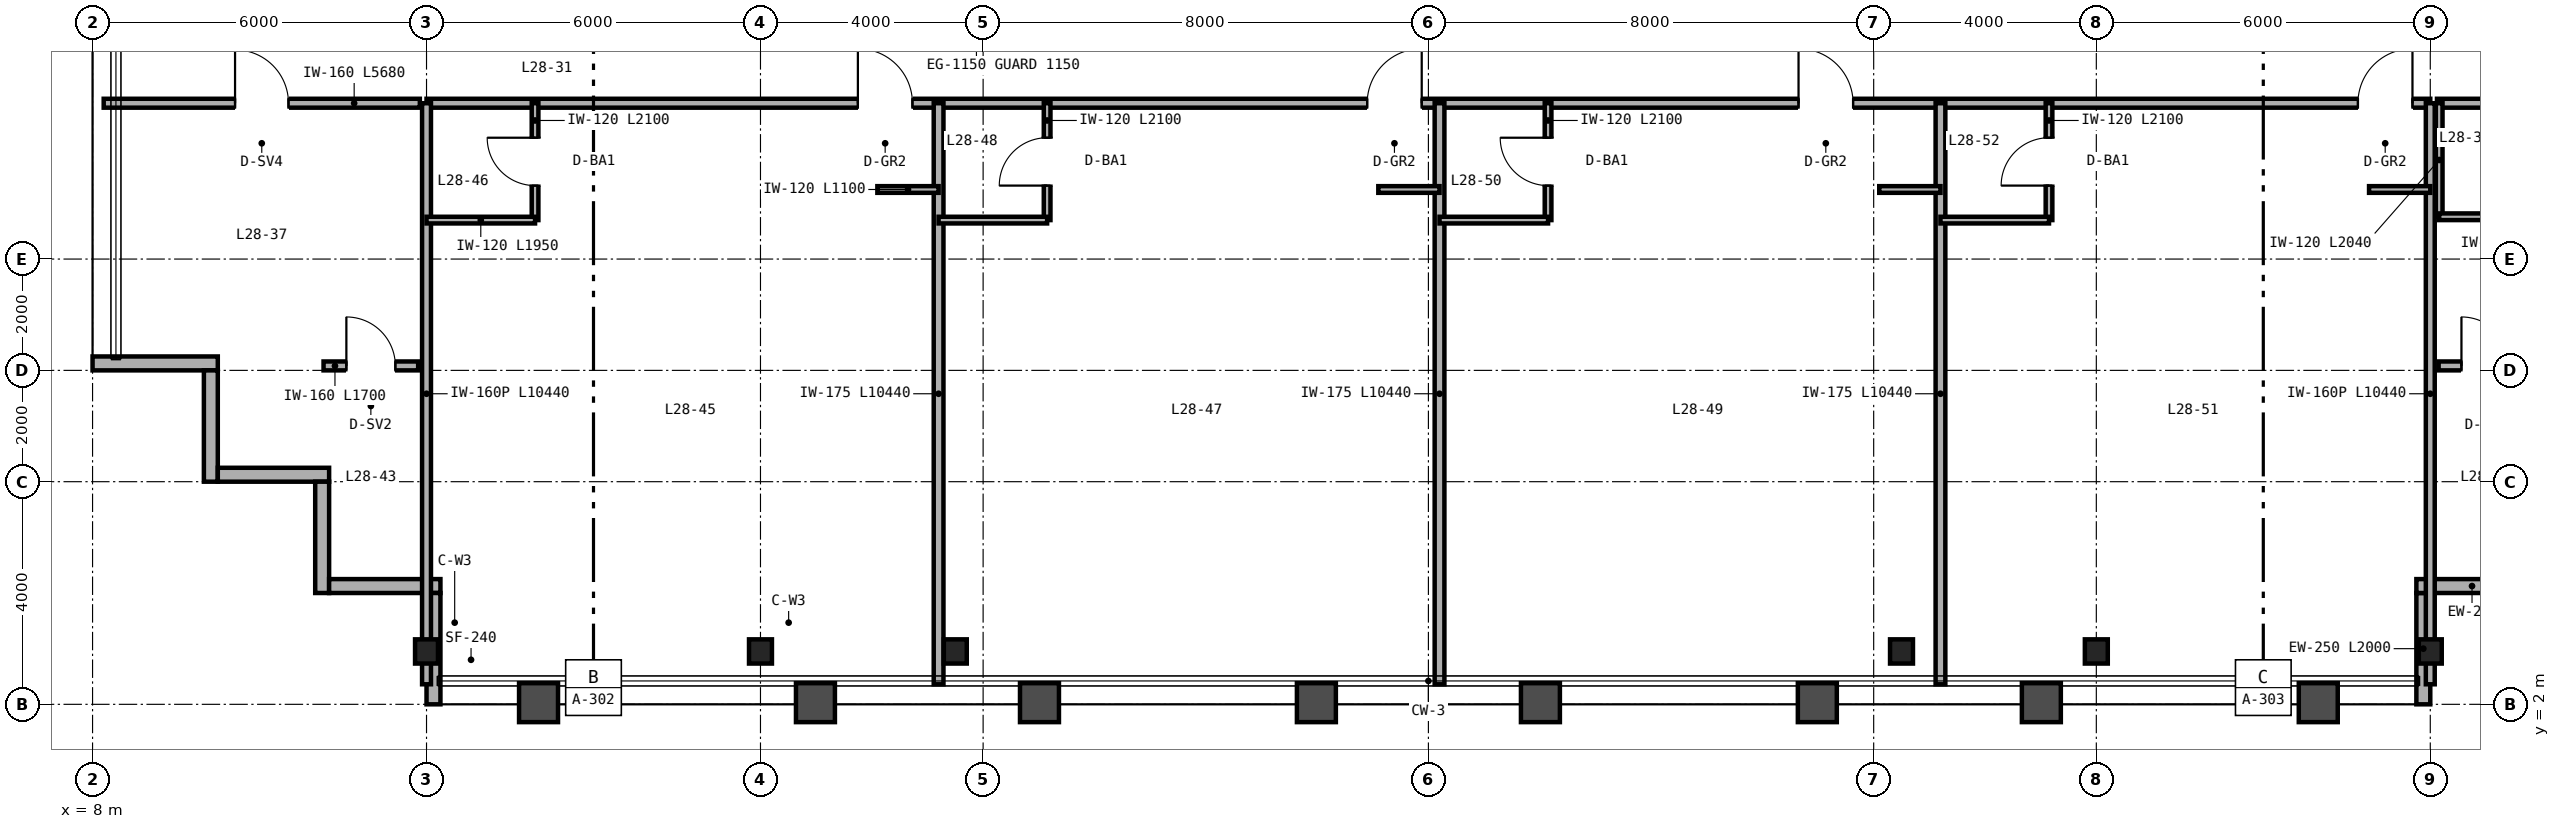
"""IFC4 building model, lengths in metres.
Left out: names, types, materials, properties, quantities, classifications, styles, units other than length and angle.
Written with IfcOpenShell. Run it as: python <this file> out.ifc"""

import sys

from ifc_helpers import new_model, si_unit, direction, frame, frame_2d, origin, origin_2d, place, context, subcontext, project, spatial, rectangle, i_section, extrude, source, transform, mapped, element, fill, save


model = new_model("IFC4")
c1 = context("Model", 3, precision=1e-05, world=origin(), true_north=direction((0.0, 1.0)))
c2 = subcontext(c1, "Body", "Model", "MODEL_VIEW")
j1 = project(units=[si_unit("LENGTHUNIT", "METRE"), si_unit("PLANEANGLEUNIT", "RADIAN")], contexts=[c1])
p1 = place(None, origin())
s1 = spatial("IfcSite", under=j1, at=p1, CompositionType="ELEMENT")
p2 = place(p1, origin())
s2 = spatial("IfcBuilding", under=s1, at=p2, CompositionType="ELEMENT")
p3 = place(p2, frame((0.0, 0.0, 115.2)))
s3 = spatial("IfcBuildingStorey", under=s2, at=p3, CompositionType="ELEMENT", Elevation=115.2)
m1 = source(origin(), c2, "Body", "SweptSolid", [
    extrude(i_section(OverallWidth=0.412, OverallDepth=0.435, WebThickness=0.036, FlangeThickness=0.057, FilletRadius=0.025, at=origin_2d()), origin(), (0.0, 0.0, 1.0), 3.36),
])
for number, where, z_axis, x_axis in (
    (1, (14.0, 2.95, 0.0), (0.0, 0.0, 1.0), (1.0, 0.0, 0.0)),
    (2, (20.0, 2.95, 0.0), (0.0, 0.0, 1.0), (1.0, 0.0, 0.0)),
    (3, (23.5, 2.95, 0.0), (0.0, 0.0, 1.0), (1.0, 0.0, 0.0)),
    (4, (40.5, 2.95, 0.0), (0.0, 0.0, 1.0), (1.0, 0.0, 0.0)),
    (5, (44.0, 2.95, 0.0), (0.0, 0.0, 1.0), (1.0, 0.0, 0.0)),
    (6, (50.0, 2.95, 0.0), (0.0, 0.0, 1.0), (1.0, 0.0, 0.0)),
):
    element("IfcColumn", number, at=place(p3, frame(where, z_axis=z_axis, x_axis=x_axis)), inside=s3, PredefinedType="COLUMN", context=c2, shape_type="MappedRepresentation", body=[
        mapped(m1, transform((0.0, 0.0, 0.0), scale=1.0)),
    ])
p4 = place(p3, frame((49.875, 2.0, 0.0), z_axis=(0.0, 0.0, 1.0), x_axis=(0.0, 1.0, 0.0)))
e7 = element("IfcWall", 7, at=p4, inside=s3, PredefinedType="SOLIDWALL", context=c2, shape_type="SweptSolid", body=[
    extrude(rectangle(XDim=2.0, YDim=0.25, at=frame_2d((1.0, 0.0))), origin(), (0.0, 0.0, 1.0), 2.667),
])
p5 = place(p3, frame((49.75, 4.125, 0.0), z_axis=(0.0, 0.0, 1.0), x_axis=(1.0, 0.0, 0.0)))
e8 = element("IfcWall", 8, at=p5, inside=s3, PredefinedType="SOLIDWALL", context=c2, shape_type="SweptSolid", body=[
    extrude(rectangle(XDim=2.0, YDim=0.25, at=frame_2d((1.0, 0.0))), origin(), (0.0, 0.0, 1.0), 3.36),
])
p6 = place(p3, frame((8.0, 8.125, 0.0), z_axis=(0.0, 0.0, 1.0), x_axis=(1.0, 0.0, 0.0)))
e9 = element("IfcWall", 9, at=p6, inside=s3, PredefinedType="SOLIDWALL", context=c2, shape_type="SweptSolid", body=[
    extrude(rectangle(XDim=2.25, YDim=0.25, at=frame_2d((1.125, 0.0))), origin(), (0.0, 0.0, 1.0), 3.36),
])
for number, where, z_axis, x_axis in (
    (10, (10.125, 8.0, 0.0), (0.0, 0.0, 1.0), (0.0, -1.0, 0.0)),
    (11, (10.25, 6.125, 0.0), (0.0, 0.0, 1.0), (1.0, 0.0, 0.0)),
    (12, (12.125, 6.0, 0.0), (0.0, 0.0, 1.0), (0.0, -1.0, 0.0)),
    (13, (12.25, 4.125, 0.0), (0.0, 0.0, 1.0), (1.0, 0.0, 0.0)),
):
    element("IfcWall", number, at=place(p3, frame(where, z_axis=z_axis, x_axis=x_axis)), inside=s3, PredefinedType="SOLIDWALL", context=c2, shape_type="SweptSolid", body=[
        extrude(rectangle(XDim=2.0, YDim=0.25, at=frame_2d((1.0, 0.0))), origin(), (0.0, 0.0, 1.0), 3.36),
    ])
p7 = place(p3, frame((14.125, 4.0, 0.0), z_axis=(0.0, 0.0, 1.0), x_axis=(0.0, -1.0, 0.0)))
e14 = element("IfcWall", 14, at=p7, inside=s3, PredefinedType="SOLIDWALL", context=c2, shape_type="SweptSolid", body=[
    extrude(rectangle(XDim=2.0, YDim=0.25, at=frame_2d((1.0, 0.0))), origin(), (0.0, 0.0, 1.0), 2.667),
])
p8 = place(p3, frame((8.2, 12.8, 0.0), z_axis=(0.0, 0.0, 1.0), x_axis=(1.0, 0.0, 0.0)))
e15 = element("IfcWall", 15, at=p8, inside=s3, PredefinedType="PARTITIONING", context=c2, shape_type="SweptSolid", body=[
    extrude(rectangle(XDim=5.68, YDim=0.16, at=frame_2d((2.84, 0.0))), origin(), (0.0, 0.0, 1.0), 3.36),
])
p9 = place(p8, frame((2.36, 0.0, 0.0)))
e16 = element("IfcOpeningElement", 16, at=p9, cuts=e15, PredefinedType="OPENING", context=c2, shape_type="SweptSolid", body=[
    extrude(rectangle(XDim=0.96, YDim=2.15, at=frame_2d((0.48, 1.075))), frame((0.0, 0.09, 0.0), z_axis=(0.0, -1.0, 0.0), x_axis=(1.0, 0.0, 0.0)), (0.0, 0.0, 1.0), 0.18),
])
p10 = place(p3, frame((50.12, 12.8, 0.0), z_axis=(0.0, 0.0, 1.0), x_axis=(1.0, 0.0, 0.0)))
e17 = element("IfcWall", 17, at=p10, inside=s3, PredefinedType="PARTITIONING", context=c2, shape_type="SweptSolid", body=[
    extrude(rectangle(XDim=5.68, YDim=0.16, at=frame_2d((2.84, 0.0))), origin(), (0.0, 0.0, 1.0), 3.36),
])
p11 = place(p10, frame((3.15, 0.0, 0.0)))
e18 = element("IfcOpeningElement", 18, at=p11, cuts=e17, PredefinedType="OPENING", context=c2, shape_type="SweptSolid", body=[
    extrude(rectangle(XDim=0.94, YDim=2.15, at=frame_2d((0.47, 1.075))), frame((0.0, 0.09, 0.0), z_axis=(0.0, -1.0, 0.0), x_axis=(1.0, 0.0, 0.0)), (0.0, 0.0, 1.0), 0.18),
])
p12 = place(p3, frame((50.16, 10.76, 0.0), z_axis=(0.0, 0.0, 1.0), x_axis=(0.0, 1.0, 0.0)))
e19 = element("IfcWall", 19, at=p12, inside=s3, PredefinedType="PARTITIONING", context=c2, shape_type="SweptSolid", body=[
    extrude(rectangle(XDim=2.04, YDim=0.12, at=frame_2d((1.02, 0.0))), origin(), (0.0, 0.0, 1.0), 3.36),
])
p13 = place(p3, frame((50.16, 10.76, 0.0), z_axis=(0.0, 0.0, 1.0), x_axis=(1.0, 0.0, 0.0)))
e20 = element("IfcWall", 20, at=p13, inside=s3, PredefinedType="PARTITIONING", context=c2, shape_type="SweptSolid", body=[
    extrude(rectangle(XDim=1.65, YDim=0.12, at=frame_2d((0.825, 0.0))), origin(), (0.0, 0.0, 1.0), 3.36),
])
p14 = place(p3, frame((12.15, 8.08, 0.0), z_axis=(0.0, 0.0, 1.0), x_axis=(1.0, 0.0, 0.0)))
e21 = element("IfcWall", 21, at=p14, inside=s3, PredefinedType="PARTITIONING", context=c2, shape_type="SweptSolid", body=[
    extrude(rectangle(XDim=1.7, YDim=0.16, at=frame_2d((0.85, 0.0))), origin(), (0.0, 0.0, 1.0), 3.36),
])
p15 = place(p14, frame((0.41, 0.0, 0.0)))
e22 = element("IfcOpeningElement", 22, at=p15, cuts=e21, PredefinedType="OPENING", context=c2, shape_type="SweptSolid", body=[
    extrude(rectangle(XDim=0.88, YDim=2.15, at=frame_2d((0.44, 1.075))), frame((0.0, 0.09, 0.0), z_axis=(0.0, -1.0, 0.0), x_axis=(1.0, 0.0, 0.0)), (0.0, 0.0, 1.0), 0.18),
])
p16 = place(p3, frame((50.15, 8.08, 0.0), z_axis=(0.0, 0.0, 1.0), x_axis=(1.0, 0.0, 0.0)))
e23 = element("IfcWall", 23, at=p16, inside=s3, PredefinedType="PARTITIONING", context=c2, shape_type="SweptSolid", body=[
    extrude(rectangle(XDim=1.7, YDim=0.16, at=frame_2d((0.85, 0.0))), origin(), (0.0, 0.0, 1.0), 3.36),
])
p17 = place(p16, frame((0.41, 0.0, 0.0)))
e24 = element("IfcOpeningElement", 24, at=p17, cuts=e23, PredefinedType="OPENING", context=c2, shape_type="SweptSolid", body=[
    extrude(rectangle(XDim=0.88, YDim=2.15, at=frame_2d((0.44, 1.075))), frame((0.0, 0.09, 0.0), z_axis=(0.0, -1.0, 0.0), x_axis=(1.0, 0.0, 0.0)), (0.0, 0.0, 1.0), 0.18),
])
p18 = place(p3, frame((14.0, 12.8, 0.0), z_axis=(0.0, 0.0, 1.0), x_axis=(1.0, 0.0, 0.0)))
e25 = element("IfcWall", 25, at=p18, inside=s3, PredefinedType="PARTITIONING", context=c2, shape_type="SweptSolid", body=[
    extrude(rectangle(XDim=36.0, YDim=0.16, at=frame_2d((18.0, 0.0))), origin(), (0.0, 0.0, 1.0), 2.581),
])
p19 = place(p18, frame((7.75, 0.0, 0.0)))
e26 = element("IfcOpeningElement", 26, at=p19, cuts=e25, PredefinedType="OPENING", context=c2, shape_type="SweptSolid", body=[
    extrude(rectangle(XDim=0.98, YDim=2.2, at=frame_2d((0.49, 1.1))), frame((0.0, 0.09, 0.0), z_axis=(0.0, -1.0, 0.0), x_axis=(1.0, 0.0, 0.0)), (0.0, 0.0, 1.0), 0.18),
])
p20 = place(p18, frame((16.9, 0.0, 0.0)))
e27 = element("IfcOpeningElement", 27, at=p20, cuts=e25, PredefinedType="OPENING", context=c2, shape_type="SweptSolid", body=[
    extrude(rectangle(XDim=0.98, YDim=2.2, at=frame_2d((0.49, 1.1))), frame((0.0, 0.09, 0.0), z_axis=(0.0, -1.0, 0.0), x_axis=(1.0, 0.0, 0.0)), (0.0, 0.0, 1.0), 0.18),
])
p21 = place(p18, frame((24.65, 0.0, 0.0)))
e28 = element("IfcOpeningElement", 28, at=p21, cuts=e25, PredefinedType="OPENING", context=c2, shape_type="SweptSolid", body=[
    extrude(rectangle(XDim=0.98, YDim=2.2, at=frame_2d((0.49, 1.1))), frame((0.0, 0.09, 0.0), z_axis=(0.0, -1.0, 0.0), x_axis=(1.0, 0.0, 0.0)), (0.0, 0.0, 1.0), 0.18),
])
p22 = place(p18, frame((34.7, 0.0, 0.0)))
e29 = element("IfcOpeningElement", 29, at=p22, cuts=e25, PredefinedType="OPENING", context=c2, shape_type="SweptSolid", body=[
    extrude(rectangle(XDim=0.98, YDim=2.2, at=frame_2d((0.49, 1.1))), frame((0.0, 0.09, 0.0), z_axis=(0.0, -1.0, 0.0), x_axis=(1.0, 0.0, 0.0)), (0.0, 0.0, 1.0), 0.18),
])
for number, where, z_axis, x_axis in (
    (30, (14.0, 2.36, 0.0), (0.0, 0.0, 1.0), (0.0, 1.0, 0.0)),
    (31, (50.0, 2.36, 0.0), (0.0, 0.0, 1.0), (0.0, 1.0, 0.0)),
):
    element("IfcWall", number, at=place(p3, frame(where, z_axis=z_axis, x_axis=x_axis)), inside=s3, PredefinedType="PARTITIONING", context=c2, shape_type="SweptSolid", body=[
        extrude(rectangle(XDim=10.44, YDim=0.16, at=frame_2d((5.22, 0.0))), origin(), (0.0, 0.0, 1.0), 2.667),
    ])
p23 = place(p3, frame((23.2, 2.36, 0.0), z_axis=(0.0, 0.0, 1.0), x_axis=(0.0, 1.0, 0.0)))
e32 = element("IfcWall", 32, at=p23, inside=s3, PredefinedType="PARTITIONING", context=c2, shape_type="SweptSolid", body=[
    extrude(rectangle(XDim=10.44, YDim=0.175, at=frame_2d((5.22, 0.0))), origin(), (0.0, 0.0, 1.0), 2.433),
])
p24 = place(p3, frame((15.95, 10.7, 0.0), z_axis=(0.0, 0.0, 1.0), x_axis=(0.0, 1.0, 0.0)))
e33 = element("IfcWall", 33, at=p24, inside=s3, PredefinedType="PARTITIONING", context=c2, shape_type="SweptSolid", body=[
    extrude(rectangle(XDim=2.1, YDim=0.12, at=frame_2d((1.05, 0.0))), origin(), (0.0, 0.0, 1.0), 3.36),
])
p25 = place(p24, frame((0.62, 0.0, 0.0)))
e34 = element("IfcOpeningElement", 34, at=p25, cuts=e33, PredefinedType="OPENING", context=c2, shape_type="SweptSolid", body=[
    extrude(rectangle(XDim=0.86, YDim=2.1, at=frame_2d((0.43, 1.05))), frame((0.0, 0.07, 0.0), z_axis=(0.0, -1.0, 0.0), x_axis=(1.0, 0.0, 0.0)), (0.0, 0.0, 1.0), 0.14),
])
p26 = place(p3, frame((14.0, 10.7, 0.0), z_axis=(0.0, 0.0, 1.0), x_axis=(1.0, 0.0, 0.0)))
e35 = element("IfcWall", 35, at=p26, inside=s3, PredefinedType="PARTITIONING", context=c2, shape_type="SweptSolid", body=[
    extrude(rectangle(XDim=1.95, YDim=0.12, at=frame_2d((0.975, 0.0))), origin(), (0.0, 0.0, 1.0), 3.36),
])
p27 = place(p3, frame((22.1, 11.25, 0.0), z_axis=(0.0, 0.0, 1.0), x_axis=(1.0, 0.0, 0.0)))
e36 = element("IfcWall", 36, at=p27, inside=s3, PredefinedType="PARTITIONING", context=c2, shape_type="SweptSolid", body=[
    extrude(rectangle(XDim=1.1, YDim=0.12, at=frame_2d((0.55, 0.0))), origin(), (0.0, 0.0, 1.0), 3.36),
])
p28 = place(p3, frame((32.2, 2.36, 0.0), z_axis=(0.0, 0.0, 1.0), x_axis=(0.0, 1.0, 0.0)))
e37 = element("IfcWall", 37, at=p28, inside=s3, PredefinedType="PARTITIONING", context=c2, shape_type="SweptSolid", body=[
    extrude(rectangle(XDim=10.44, YDim=0.175, at=frame_2d((5.22, 0.0))), origin(), (0.0, 0.0, 1.0), 2.433),
])
p29 = place(p3, frame((25.15, 10.7, 0.0), z_axis=(0.0, 0.0, 1.0), x_axis=(0.0, 1.0, 0.0)))
e38 = element("IfcWall", 38, at=p29, inside=s3, PredefinedType="PARTITIONING", context=c2, shape_type="SweptSolid", body=[
    extrude(rectangle(XDim=2.1, YDim=0.12, at=frame_2d((1.05, 0.0))), origin(), (0.0, 0.0, 1.0), 3.36),
])
p30 = place(p29, frame((0.62, 0.0, 0.0)))
e39 = element("IfcOpeningElement", 39, at=p30, cuts=e38, PredefinedType="OPENING", context=c2, shape_type="SweptSolid", body=[
    extrude(rectangle(XDim=0.86, YDim=2.1, at=frame_2d((0.43, 1.05))), frame((0.0, 0.07, 0.0), z_axis=(0.0, -1.0, 0.0), x_axis=(1.0, 0.0, 0.0)), (0.0, 0.0, 1.0), 0.14),
])
p31 = place(p3, frame((23.2, 10.7, 0.0), z_axis=(0.0, 0.0, 1.0), x_axis=(1.0, 0.0, 0.0)))
e40 = element("IfcWall", 40, at=p31, inside=s3, PredefinedType="PARTITIONING", context=c2, shape_type="SweptSolid", body=[
    extrude(rectangle(XDim=1.95, YDim=0.12, at=frame_2d((0.975, 0.0))), origin(), (0.0, 0.0, 1.0), 2.581),
])
p32 = place(p3, frame((31.1, 11.25, 0.0), z_axis=(0.0, 0.0, 1.0), x_axis=(1.0, 0.0, 0.0)))
e41 = element("IfcWall", 41, at=p32, inside=s3, PredefinedType="PARTITIONING", context=c2, shape_type="SweptSolid", body=[
    extrude(rectangle(XDim=1.1, YDim=0.12, at=frame_2d((0.55, 0.0))), origin(), (0.0, 0.0, 1.0), 3.36),
])
p33 = place(p3, frame((41.2, 2.36, 0.0), z_axis=(0.0, 0.0, 1.0), x_axis=(0.0, 1.0, 0.0)))
e42 = element("IfcWall", 42, at=p33, inside=s3, PredefinedType="PARTITIONING", context=c2, shape_type="SweptSolid", body=[
    extrude(rectangle(XDim=10.44, YDim=0.175, at=frame_2d((5.22, 0.0))), origin(), (0.0, 0.0, 1.0), 2.823),
])
p34 = place(p3, frame((34.15, 10.7, 0.0), z_axis=(0.0, 0.0, 1.0), x_axis=(0.0, 1.0, 0.0)))
e43 = element("IfcWall", 43, at=p34, inside=s3, PredefinedType="PARTITIONING", context=c2, shape_type="SweptSolid", body=[
    extrude(rectangle(XDim=2.1, YDim=0.12, at=frame_2d((1.05, 0.0))), origin(), (0.0, 0.0, 1.0), 3.36),
])
p35 = place(p34, frame((0.62, 0.0, 0.0)))
e44 = element("IfcOpeningElement", 44, at=p35, cuts=e43, PredefinedType="OPENING", context=c2, shape_type="SweptSolid", body=[
    extrude(rectangle(XDim=0.86, YDim=2.1, at=frame_2d((0.43, 1.05))), frame((0.0, 0.07, 0.0), z_axis=(0.0, -1.0, 0.0), x_axis=(1.0, 0.0, 0.0)), (0.0, 0.0, 1.0), 0.14),
])
p36 = place(p3, frame((32.2, 10.7, 0.0), z_axis=(0.0, 0.0, 1.0), x_axis=(1.0, 0.0, 0.0)))
e45 = element("IfcWall", 45, at=p36, inside=s3, PredefinedType="PARTITIONING", context=c2, shape_type="SweptSolid", body=[
    extrude(rectangle(XDim=1.95, YDim=0.12, at=frame_2d((0.975, 0.0))), origin(), (0.0, 0.0, 1.0), 3.36),
])
p37 = place(p3, frame((40.1, 11.25, 0.0), z_axis=(0.0, 0.0, 1.0), x_axis=(1.0, 0.0, 0.0)))
e46 = element("IfcWall", 46, at=p37, inside=s3, PredefinedType="PARTITIONING", context=c2, shape_type="SweptSolid", body=[
    extrude(rectangle(XDim=1.1, YDim=0.12, at=frame_2d((0.55, 0.0))), origin(), (0.0, 0.0, 1.0), 2.581),
])
p38 = place(p3, frame((43.15, 10.7, 0.0), z_axis=(0.0, 0.0, 1.0), x_axis=(0.0, 1.0, 0.0)))
e47 = element("IfcWall", 47, at=p38, inside=s3, PredefinedType="PARTITIONING", context=c2, shape_type="SweptSolid", body=[
    extrude(rectangle(XDim=2.1, YDim=0.12, at=frame_2d((1.05, 0.0))), origin(), (0.0, 0.0, 1.0), 3.36),
])
p39 = place(p38, frame((0.62, 0.0, 0.0)))
e48 = element("IfcOpeningElement", 48, at=p39, cuts=e47, PredefinedType="OPENING", context=c2, shape_type="SweptSolid", body=[
    extrude(rectangle(XDim=0.86, YDim=2.1, at=frame_2d((0.43, 1.05))), frame((0.0, 0.07, 0.0), z_axis=(0.0, -1.0, 0.0), x_axis=(1.0, 0.0, 0.0)), (0.0, 0.0, 1.0), 0.14),
])
p40 = place(p3, frame((41.2, 10.7, 0.0), z_axis=(0.0, 0.0, 1.0), x_axis=(1.0, 0.0, 0.0)))
e49 = element("IfcWall", 49, at=p40, inside=s3, PredefinedType="PARTITIONING", context=c2, shape_type="SweptSolid", body=[
    extrude(rectangle(XDim=1.95, YDim=0.12, at=frame_2d((0.975, 0.0))), origin(), (0.0, 0.0, 1.0), 3.36),
])
p41 = place(p3, frame((48.9, 11.25, 0.0), z_axis=(0.0, 0.0, 1.0), x_axis=(1.0, 0.0, 0.0)))
e50 = element("IfcWall", 50, at=p41, inside=s3, PredefinedType="PARTITIONING", context=c2, shape_type="SweptSolid", body=[
    extrude(rectangle(XDim=1.1, YDim=0.12, at=frame_2d((0.55, 0.0))), origin(), (0.0, 0.0, 1.0), 3.36),
])
m2 = source(origin(), c2, "Body", "SweptSolid", [
    extrude(rectangle(XDim=0.96, YDim=2.15, at=frame_2d((0.48, 1.075))), frame((0.0, 0.025, 0.0), z_axis=(0.0, -1.0, 0.0), x_axis=(1.0, 0.0, 0.0)), (0.0, 0.0, 1.0), 0.05),
])
p42 = place(p9, origin())
e51 = element("IfcDoor", 51, at=p42, inside=s3, OperationType="SINGLE_SWING_LEFT", PredefinedType="DOOR", context=c2, shape_type="MappedRepresentation", body=[
    mapped(m2, transform((0.0, 0.0, 0.0), scale=1.0)),
])
fill(e16, e51)
m3 = source(origin(), c2, "Body", "SweptSolid", [
    extrude(rectangle(XDim=0.88, YDim=2.15, at=frame_2d((0.44, 1.075))), frame((0.0, 0.025, 0.0), z_axis=(0.0, -1.0, 0.0), x_axis=(1.0, 0.0, 0.0)), (0.0, 0.0, 1.0), 0.05),
])
p43 = place(p15, origin())
e52 = element("IfcDoor", 52, at=p43, inside=s3, OperationType="SINGLE_SWING_LEFT", PredefinedType="DOOR", context=c2, shape_type="MappedRepresentation", body=[
    mapped(m3, transform((0.0, 0.0, 0.0), scale=1.0)),
])
fill(e22, e52)
p44 = place(p17, origin())
e53 = element("IfcDoor", 53, at=p44, inside=s3, OperationType="SINGLE_SWING_LEFT", PredefinedType="DOOR", context=c2, shape_type="MappedRepresentation", body=[
    mapped(m3, transform((0.0, 0.0, 0.0), scale=1.0)),
])
fill(e24, e53)
m4 = source(origin(), c2, "Body", "SweptSolid", [
    extrude(rectangle(XDim=0.86, YDim=2.1, at=frame_2d((0.43, 1.05))), frame((0.0, 0.025, 0.0), z_axis=(0.0, -1.0, 0.0), x_axis=(1.0, 0.0, 0.0)), (0.0, 0.0, 1.0), 0.05),
])
p45 = place(p25, origin())
e54 = element("IfcDoor", 54, at=p45, inside=s3, OperationType="SINGLE_SWING_RIGHT", PredefinedType="DOOR", context=c2, shape_type="MappedRepresentation", body=[
    mapped(m4, transform((0.0, 0.0, 0.0), scale=1.0)),
])
fill(e34, e54)
p46 = place(p30, origin())
e55 = element("IfcDoor", 55, at=p46, inside=s3, OperationType="SINGLE_SWING_LEFT", PredefinedType="DOOR", context=c2, shape_type="MappedRepresentation", body=[
    mapped(m4, transform((0.0, 0.0, 0.0), scale=1.0)),
])
fill(e39, e55)
p47 = place(p35, origin())
e56 = element("IfcDoor", 56, at=p47, inside=s3, OperationType="SINGLE_SWING_RIGHT", PredefinedType="DOOR", context=c2, shape_type="MappedRepresentation", body=[
    mapped(m4, transform((0.0, 0.0, 0.0), scale=1.0)),
])
fill(e44, e56)
p48 = place(p39, origin())
e57 = element("IfcDoor", 57, at=p48, inside=s3, OperationType="SINGLE_SWING_LEFT", PredefinedType="DOOR", context=c2, shape_type="MappedRepresentation", body=[
    mapped(m4, transform((0.0, 0.0, 0.0), scale=1.0)),
])
fill(e48, e57)
m5 = source(origin(), c2, "Body", "SweptSolid", [
    extrude(rectangle(XDim=0.98, YDim=2.2, at=frame_2d((0.49, 1.1))), frame((0.0, 0.025, 0.0), z_axis=(0.0, -1.0, 0.0), x_axis=(1.0, 0.0, 0.0)), (0.0, 0.0, 1.0), 0.05),
])
p49 = place(p19, origin())
e58 = element("IfcDoor", 58, at=p49, inside=s3, OperationType="SINGLE_SWING_LEFT", PredefinedType="DOOR", context=c2, shape_type="MappedRepresentation", body=[
    mapped(m5, transform((0.0, 0.0, 0.0), scale=1.0)),
])
fill(e26, e58)
p50 = place(p20, origin())
e59 = element("IfcDoor", 59, at=p50, inside=s3, OperationType="SINGLE_SWING_RIGHT", PredefinedType="DOOR", context=c2, shape_type="MappedRepresentation", body=[
    mapped(m5, transform((0.0, 0.0, 0.0), scale=1.0)),
])
fill(e27, e59)
p51 = place(p21, origin())
e60 = element("IfcDoor", 60, at=p51, inside=s3, OperationType="SINGLE_SWING_LEFT", PredefinedType="DOOR", context=c2, shape_type="MappedRepresentation", body=[
    mapped(m5, transform((0.0, 0.0, 0.0), scale=1.0)),
])
fill(e28, e60)
p52 = place(p22, origin())
e61 = element("IfcDoor", 61, at=p52, inside=s3, OperationType="SINGLE_SWING_RIGHT", PredefinedType="DOOR", context=c2, shape_type="MappedRepresentation", body=[
    mapped(m5, transform((0.0, 0.0, 0.0), scale=1.0)),
])
fill(e29, e61)
save(model, sys.argv[1])
